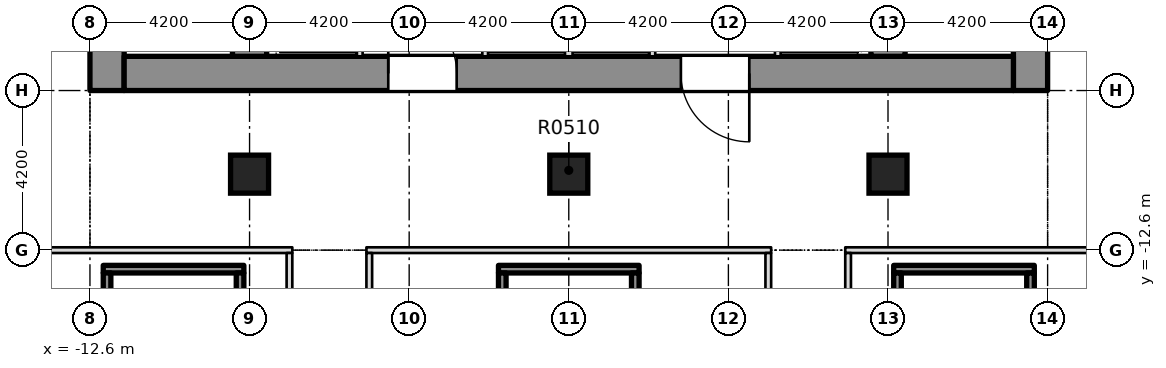
"""IFC4 building model, lengths in metres.
Left out: names, types, materials, properties, quantities, classifications, styles, units other than length and angle.
Written with IfcOpenShell. Run it as: python <this file> out.ifc"""

import sys

from ifc_helpers import new_model, si_unit, direction, frame, frame_2d, origin, origin_2d, place, context, subcontext, project, spatial, rectangle, extrude, element, fill, save


model = new_model("IFC4")
c1 = context("Model", 3, precision=1e-05, world=origin(), true_north=direction((0.0, 1.0)))
c2 = subcontext(c1, "Body", "Model", "MODEL_VIEW")
j1 = project(units=[si_unit("LENGTHUNIT", "METRE"), si_unit("PLANEANGLEUNIT", "RADIAN")], contexts=[c1])
p1 = place(None, origin())
s1 = spatial("IfcSite", under=j1, at=p1, CompositionType="ELEMENT")
p2 = place(p1, origin())
s2 = spatial("IfcBuilding", under=s1, at=p2, CompositionType="ELEMENT")
p3 = place(p2, frame((0.0, 0.0, 30.0)))
s3 = spatial("IfcBuildingStorey", under=s2, at=p3, CompositionType="ELEMENT", Elevation=30.0)
p4 = place(p3, frame((12.15, -8.4, -0.4), z_axis=(0.0, 0.0, 1.0), x_axis=(0.0, 1.0, 0.0)))
e1 = element("IfcWall", 1, at=p4, inside=s3, PredefinedType="SHEAR", context=c2, shape_type="SweptSolid", body=[
    extrude(rectangle(XDim=30.15, YDim=0.9, at=frame_2d((15.075, 0.0))), origin(), (0.0, 0.0, 1.0), 4.58),
])
p5 = place(p4, frame((2.925, 0.0, 0.4)))
e2 = element("IfcOpeningElement", 2, at=p5, cuts=e1, PredefinedType="OPENING", context=c2, shape_type="SweptSolid", body=[
    extrude(rectangle(XDim=0.95, YDim=2.1, at=frame_2d((0.475, 1.05))), frame((0.0, 0.46, 0.0), z_axis=(0.0, -1.0, 0.0), x_axis=(1.0, 0.0, 0.0)), (0.0, 0.0, 1.0), 0.92),
])
p6 = place(p4, frame((7.025, 0.0, 0.4)))
e3 = element("IfcOpeningElement", 3, at=p6, cuts=e1, PredefinedType="OPENING", context=c2, shape_type="SweptSolid", body=[
    extrude(rectangle(XDim=0.95, YDim=2.1, at=frame_2d((0.475, 1.05))), frame((0.0, 0.46, 0.0), z_axis=(0.0, -1.0, 0.0), x_axis=(1.0, 0.0, 0.0)), (0.0, 0.0, 1.0), 0.92),
])
p7 = place(p4, frame((10.875, 0.0, 0.4)))
e4 = element("IfcOpeningElement", 4, at=p7, cuts=e1, PredefinedType="OPENING", context=c2, shape_type="SweptSolid", body=[
    extrude(rectangle(XDim=0.95, YDim=2.1, at=frame_2d((0.475, 1.05))), frame((0.0, 0.46, 0.0), z_axis=(0.0, -1.0, 0.0), x_axis=(1.0, 0.0, 0.0)), (0.0, 0.0, 1.0), 0.92),
])
p8 = place(p4, frame((15.625, 0.0, 0.4)))
e5 = element("IfcOpeningElement", 5, at=p8, cuts=e1, PredefinedType="OPENING", context=c2, shape_type="SweptSolid", body=[
    extrude(rectangle(XDim=0.95, YDim=2.1, at=frame_2d((0.475, 1.05))), frame((0.0, 0.46, 0.0), z_axis=(0.0, -1.0, 0.0), x_axis=(1.0, 0.0, 0.0)), (0.0, 0.0, 1.0), 0.92),
])
p9 = place(p4, frame((24.75, 0.0, 0.4)))
e6 = element("IfcOpeningElement", 6, at=p9, cuts=e1, PredefinedType="OPENING", context=c2, shape_type="SweptSolid", body=[
    extrude(rectangle(XDim=0.95, YDim=2.1, at=frame_2d((0.475, 1.05))), frame((0.0, 0.46, 0.0), z_axis=(0.0, -1.0, 0.0), x_axis=(1.0, 0.0, 0.0)), (0.0, 0.0, 1.0), 0.92),
])
p10 = place(p4, frame((19.3, 0.0, 0.4)))
e7 = element("IfcOpeningElement", 7, at=p10, cuts=e1, PredefinedType="OPENING", context=c2, shape_type="SweptSolid", body=[
    extrude(rectangle(XDim=1.2, YDim=2.1, at=frame_2d((0.6, 1.05))), frame((0.0, 0.46, 0.0), z_axis=(0.0, -1.0, 0.0), x_axis=(1.0, 0.0, 0.0)), (0.0, 0.0, 1.0), 0.92),
])
p11 = place(p3, frame((-12.15, -8.4, -0.4), z_axis=(0.0, 0.0, 1.0), x_axis=(0.0, 1.0, 0.0)))
e8 = element("IfcWall", 8, at=p11, inside=s3, PredefinedType="SHEAR", context=c2, shape_type="SweptSolid", body=[
    extrude(rectangle(XDim=30.15, YDim=0.9, at=frame_2d((15.075, 0.0))), origin(), (0.0, 0.0, 1.0), 4.58),
])
p12 = place(p11, frame((2.875, 0.0, 0.4)))
e9 = element("IfcOpeningElement", 9, at=p12, cuts=e8, PredefinedType="OPENING", context=c2, shape_type="SweptSolid", body=[
    extrude(rectangle(XDim=0.95, YDim=2.1, at=frame_2d((0.475, 1.05))), frame((0.0, 0.46, 0.0), z_axis=(0.0, -1.0, 0.0), x_axis=(1.0, 0.0, 0.0)), (0.0, 0.0, 1.0), 0.92),
])
p13 = place(p11, frame((6.575, 0.0, 0.4)))
e10 = element("IfcOpeningElement", 10, at=p13, cuts=e8, PredefinedType="OPENING", context=c2, shape_type="SweptSolid", body=[
    extrude(rectangle(XDim=0.95, YDim=2.1, at=frame_2d((0.475, 1.05))), frame((0.0, 0.46, 0.0), z_axis=(0.0, -1.0, 0.0), x_axis=(1.0, 0.0, 0.0)), (0.0, 0.0, 1.0), 0.92),
])
p14 = place(p11, frame((9.425, 0.0, 0.4)))
e11 = element("IfcOpeningElement", 11, at=p14, cuts=e8, PredefinedType="OPENING", context=c2, shape_type="SweptSolid", body=[
    extrude(rectangle(XDim=0.95, YDim=2.1, at=frame_2d((0.475, 1.05))), frame((0.0, 0.46, 0.0), z_axis=(0.0, -1.0, 0.0), x_axis=(1.0, 0.0, 0.0)), (0.0, 0.0, 1.0), 0.92),
])
p15 = place(p11, frame((13.225, 0.0, 0.4)))
e12 = element("IfcOpeningElement", 12, at=p15, cuts=e8, PredefinedType="OPENING", context=c2, shape_type="SweptSolid", body=[
    extrude(rectangle(XDim=0.95, YDim=2.1, at=frame_2d((0.475, 1.05))), frame((0.0, 0.46, 0.0), z_axis=(0.0, -1.0, 0.0), x_axis=(1.0, 0.0, 0.0)), (0.0, 0.0, 1.0), 0.92),
])
p16 = place(p11, frame((16.775, 0.0, 0.4)))
e13 = element("IfcOpeningElement", 13, at=p16, cuts=e8, PredefinedType="OPENING", context=c2, shape_type="SweptSolid", body=[
    extrude(rectangle(XDim=0.95, YDim=2.1, at=frame_2d((0.475, 1.05))), frame((0.0, 0.46, 0.0), z_axis=(0.0, -1.0, 0.0), x_axis=(1.0, 0.0, 0.0)), (0.0, 0.0, 1.0), 0.92),
])
p17 = place(p11, frame((24.75, 0.0, 0.4)))
e14 = element("IfcOpeningElement", 14, at=p17, cuts=e8, PredefinedType="OPENING", context=c2, shape_type="SweptSolid", body=[
    extrude(rectangle(XDim=0.95, YDim=2.1, at=frame_2d((0.475, 1.05))), frame((0.0, 0.46, 0.0), z_axis=(0.0, -1.0, 0.0), x_axis=(1.0, 0.0, 0.0)), (0.0, 0.0, 1.0), 0.92),
])
p18 = place(p11, frame((19.3, 0.0, 0.4)))
e15 = element("IfcOpeningElement", 15, at=p18, cuts=e8, PredefinedType="OPENING", context=c2, shape_type="SweptSolid", body=[
    extrude(rectangle(XDim=1.2, YDim=2.1, at=frame_2d((0.6, 1.05))), frame((0.0, 0.46, 0.0), z_axis=(0.0, -1.0, 0.0), x_axis=(1.0, 0.0, 0.0)), (0.0, 0.0, 1.0), 0.92),
])
p19 = place(p3, frame((-11.7, -7.95, -0.4), z_axis=(0.0, 0.0, 1.0), x_axis=(1.0, 0.0, 0.0)))
e16 = element("IfcWall", 16, at=p19, inside=s3, PredefinedType="SHEAR", context=c2, shape_type="SweptSolid", body=[
    extrude(rectangle(XDim=23.4, YDim=0.9, at=frame_2d((11.7, 0.0))), origin(), (0.0, 0.0, 1.0), 4.58),
])
p20 = place(p19, frame((6.95, 0.0, 0.4)))
e17 = element("IfcOpeningElement", 17, at=p20, cuts=e16, PredefinedType="OPENING", context=c2, shape_type="SweptSolid", body=[
    extrude(rectangle(XDim=1.8, YDim=2.1, at=frame_2d((0.9, 1.05))), frame((0.0, 0.46, 0.0), z_axis=(0.0, -1.0, 0.0), x_axis=(1.0, 0.0, 0.0)), (0.0, 0.0, 1.0), 0.92),
])
p21 = place(p19, frame((14.65, 0.0, 0.4)))
e18 = element("IfcOpeningElement", 18, at=p21, cuts=e16, PredefinedType="OPENING", context=c2, shape_type="SweptSolid", body=[
    extrude(rectangle(XDim=1.8, YDim=2.1, at=frame_2d((0.9, 1.05))), frame((0.0, 0.46, 0.0), z_axis=(0.0, -1.0, 0.0), x_axis=(1.0, 0.0, 0.0)), (0.0, 0.0, 1.0), 0.92),
])
p22 = place(p3, frame((-8.4, -7.5, -0.4), z_axis=(0.0, 0.0, 1.0), x_axis=(0.0, 1.0, 0.0)))
e19 = element("IfcWall", 19, at=p22, inside=s3, PredefinedType="SHEAR", context=c2, shape_type="SweptSolid", body=[
    extrude(rectangle(XDim=28.35, YDim=0.9, at=frame_2d((14.175, 0.0))), origin(), (0.0, 0.0, 1.0), 4.58),
])
p23 = place(p22, frame((18.4, 0.0, 0.4)))
e20 = element("IfcOpeningElement", 20, at=p23, cuts=e19, PredefinedType="OPENING", context=c2, shape_type="SweptSolid", body=[
    extrude(rectangle(XDim=1.2, YDim=2.1, at=frame_2d((0.6, 1.05))), frame((0.0, 0.46, 0.0), z_axis=(0.0, -1.0, 0.0), x_axis=(1.0, 0.0, 0.0)), (0.0, 0.0, 1.0), 0.92),
])
p24 = place(p3, frame((8.4, -7.5, -0.4), z_axis=(0.0, 0.0, 1.0), x_axis=(0.0, 1.0, 0.0)))
e21 = element("IfcWall", 21, at=p24, inside=s3, PredefinedType="SHEAR", context=c2, shape_type="SweptSolid", body=[
    extrude(rectangle(XDim=28.35, YDim=0.9, at=frame_2d((14.175, 0.0))), origin(), (0.0, 0.0, 1.0), 4.58),
])
p25 = place(p24, frame((18.4, 0.0, 0.4)))
e22 = element("IfcOpeningElement", 22, at=p25, cuts=e21, PredefinedType="OPENING", context=c2, shape_type="SweptSolid", body=[
    extrude(rectangle(XDim=1.2, YDim=2.1, at=frame_2d((0.6, 1.05))), frame((0.0, 0.46, 0.0), z_axis=(0.0, -1.0, 0.0), x_axis=(1.0, 0.0, 0.0)), (0.0, 0.0, 1.0), 0.92),
])
for number, where, z_axis, x_axis in (
    (23, (-8.4, -10.6, -0.4), (0.0, 0.0, 1.0), (1.0, 0.0, 0.0)),
    (24, (0.0, -10.6, -0.4), (0.0, 0.0, 1.0), (1.0, 0.0, 0.0)),
    (25, (8.4, -10.6, -0.4), (0.0, 0.0, 1.0), (1.0, 0.0, 0.0)),
):
    element("IfcColumn", number, at=place(p3, frame(where, z_axis=z_axis, x_axis=x_axis)), inside=s3, PredefinedType="COLUMN", context=c2, shape_type="SweptSolid", body=[
        extrude(rectangle(XDim=1.0, YDim=1.0, at=origin_2d()), origin(), (0.0, 0.0, 1.0), 4.58),
    ])
p26 = place(p3, frame((-16.9, -12.6, 0.0), z_axis=(0.0, 0.0, 1.0), x_axis=(1.0, 0.0, 0.0)))
e26 = element("IfcWall", 26, at=p26, inside=s3, PredefinedType="PARTITIONING", context=c2, shape_type="SweptSolid", body=[
    extrude(rectangle(XDim=9.625, YDim=0.15, at=frame_2d((4.812, 0.0))), origin(), (0.0, 0.0, 1.0), 4.18),
])
p27 = place(p3, frame((-5.325, -12.6, 0.0), z_axis=(0.0, 0.0, 1.0), x_axis=(1.0, 0.0, 0.0)))
e27 = element("IfcWall", 27, at=p27, inside=s3, PredefinedType="PARTITIONING", context=c2, shape_type="SweptSolid", body=[
    extrude(rectangle(XDim=10.65, YDim=0.15, at=frame_2d((5.325, 0.0))), origin(), (0.0, 0.0, 1.0), 4.18),
])
p28 = place(p3, frame((7.275, -12.6, 0.0), z_axis=(0.0, 0.0, 1.0), x_axis=(1.0, 0.0, 0.0)))
e28 = element("IfcWall", 28, at=p28, inside=s3, PredefinedType="PARTITIONING", context=c2, shape_type="SweptSolid", body=[
    extrude(rectangle(XDim=9.625, YDim=0.15, at=frame_2d((4.812, 0.0))), origin(), (0.0, 0.0, 1.0), 4.18),
])
for number, where, z_axis, x_axis in (
    (29, (-7.35, -18.125, 0.0), (0.0, 0.0, 1.0), (0.0, 1.0, 0.0)),
    (30, (-5.25, -18.125, 0.0), (0.0, 0.0, 1.0), (0.0, 1.0, 0.0)),
    (31, (5.25, -18.125, 0.0), (0.0, 0.0, 1.0), (0.0, 1.0, 0.0)),
    (32, (7.35, -18.125, 0.0), (0.0, 0.0, 1.0), (0.0, 1.0, 0.0)),
):
    element("IfcWall", number, at=place(p3, frame(where, z_axis=z_axis, x_axis=x_axis)), inside=s3, PredefinedType="PARTITIONING", context=c2, shape_type="SweptSolid", body=[
        extrude(rectangle(XDim=5.45, YDim=0.15, at=frame_2d((2.725, 0.0))), origin(), (0.0, 0.0, 1.0), 4.18),
    ])
p29 = place(p3, frame((-5.5, -7.499, 0.0), z_axis=(0.0, 0.0, 1.0), x_axis=(0.0, 1.0, 0.0)))
e33 = element("IfcWall", 33, at=p29, inside=s3, PredefinedType="PARTITIONING", context=c2, shape_type="SweptSolid", body=[
    extrude(rectangle(XDim=11.924, YDim=0.15, at=frame_2d((5.962, 0.0))), origin(), (0.0, 0.0, 1.0), 4.18),
])
p30 = place(p29, frame((0.949, 0.0, 0.0)))
e34 = element("IfcOpeningElement", 34, at=p30, cuts=e33, PredefinedType="OPENING", context=c2, shape_type="SweptSolid", body=[
    extrude(rectangle(XDim=1.1, YDim=2.1, at=frame_2d((0.55, 1.05))), frame((0.0, 0.085, 0.0), z_axis=(0.0, -1.0, 0.0), x_axis=(1.0, 0.0, 0.0)), (0.0, 0.0, 1.0), 0.17),
])
p31 = place(p29, frame((3.949, 0.0, 0.0)))
e35 = element("IfcOpeningElement", 35, at=p31, cuts=e33, PredefinedType="OPENING", context=c2, shape_type="SweptSolid", body=[
    extrude(rectangle(XDim=1.1, YDim=2.1, at=frame_2d((0.55, 1.05))), frame((0.0, 0.085, 0.0), z_axis=(0.0, -1.0, 0.0), x_axis=(1.0, 0.0, 0.0)), (0.0, 0.0, 1.0), 0.17),
])
p32 = place(p29, frame((6.949, 0.0, 0.0)))
e36 = element("IfcOpeningElement", 36, at=p32, cuts=e33, PredefinedType="OPENING", context=c2, shape_type="SweptSolid", body=[
    extrude(rectangle(XDim=1.1, YDim=2.1, at=frame_2d((0.55, 1.05))), frame((0.0, 0.085, 0.0), z_axis=(0.0, -1.0, 0.0), x_axis=(1.0, 0.0, 0.0)), (0.0, 0.0, 1.0), 0.17),
])
p33 = place(p29, frame((9.949, 0.0, 0.0)))
e37 = element("IfcOpeningElement", 37, at=p33, cuts=e33, PredefinedType="OPENING", context=c2, shape_type="SweptSolid", body=[
    extrude(rectangle(XDim=1.1, YDim=2.1, at=frame_2d((0.55, 1.05))), frame((0.0, 0.085, 0.0), z_axis=(0.0, -1.0, 0.0), x_axis=(1.0, 0.0, 0.0)), (0.0, 0.0, 1.0), 0.17),
])
p34 = place(p3, frame((-2.2, -7.499, 0.0), z_axis=(0.0, 0.0, 1.0), x_axis=(0.0, 1.0, 0.0)))
e38 = element("IfcWall", 38, at=p34, inside=s3, PredefinedType="PARTITIONING", context=c2, shape_type="SweptSolid", body=[
    extrude(rectangle(XDim=11.924, YDim=0.15, at=frame_2d((5.962, 0.0))), origin(), (0.0, 0.0, 1.0), 4.18),
])
p35 = place(p34, frame((0.949, 0.0, 0.0)))
e39 = element("IfcOpeningElement", 39, at=p35, cuts=e38, PredefinedType="OPENING", context=c2, shape_type="SweptSolid", body=[
    extrude(rectangle(XDim=1.1, YDim=2.1, at=frame_2d((0.55, 1.05))), frame((0.0, 0.085, 0.0), z_axis=(0.0, -1.0, 0.0), x_axis=(1.0, 0.0, 0.0)), (0.0, 0.0, 1.0), 0.17),
])
p36 = place(p34, frame((3.949, 0.0, 0.0)))
e40 = element("IfcOpeningElement", 40, at=p36, cuts=e38, PredefinedType="OPENING", context=c2, shape_type="SweptSolid", body=[
    extrude(rectangle(XDim=1.1, YDim=2.1, at=frame_2d((0.55, 1.05))), frame((0.0, 0.085, 0.0), z_axis=(0.0, -1.0, 0.0), x_axis=(1.0, 0.0, 0.0)), (0.0, 0.0, 1.0), 0.17),
])
p37 = place(p34, frame((6.949, 0.0, 0.0)))
e41 = element("IfcOpeningElement", 41, at=p37, cuts=e38, PredefinedType="OPENING", context=c2, shape_type="SweptSolid", body=[
    extrude(rectangle(XDim=1.1, YDim=2.1, at=frame_2d((0.55, 1.05))), frame((0.0, 0.085, 0.0), z_axis=(0.0, -1.0, 0.0), x_axis=(1.0, 0.0, 0.0)), (0.0, 0.0, 1.0), 0.17),
])
p38 = place(p34, frame((9.949, 0.0, 0.0)))
e42 = element("IfcOpeningElement", 42, at=p38, cuts=e38, PredefinedType="OPENING", context=c2, shape_type="SweptSolid", body=[
    extrude(rectangle(XDim=1.1, YDim=2.1, at=frame_2d((0.55, 1.05))), frame((0.0, 0.085, 0.0), z_axis=(0.0, -1.0, 0.0), x_axis=(1.0, 0.0, 0.0)), (0.0, 0.0, 1.0), 0.17),
])
p39 = place(p3, frame((0.0, -7.499, 0.0), z_axis=(0.0, 0.0, 1.0), x_axis=(0.0, 1.0, 0.0)))
e43 = element("IfcWall", 43, at=p39, inside=s3, PredefinedType="PARTITIONING", context=c2, shape_type="SweptSolid", body=[
    extrude(rectangle(XDim=11.924, YDim=0.2, at=frame_2d((5.962, 0.0))), origin(), (0.0, 0.0, 1.0), 4.18),
])
p40 = place(p3, frame((2.2, -7.499, 0.0), z_axis=(0.0, 0.0, 1.0), x_axis=(0.0, 1.0, 0.0)))
e44 = element("IfcWall", 44, at=p40, inside=s3, PredefinedType="PARTITIONING", context=c2, shape_type="SweptSolid", body=[
    extrude(rectangle(XDim=11.924, YDim=0.15, at=frame_2d((5.962, 0.0))), origin(), (0.0, 0.0, 1.0), 4.18),
])
p41 = place(p3, frame((5.5, -7.499, 0.0), z_axis=(0.0, 0.0, 1.0), x_axis=(0.0, 1.0, 0.0)))
e45 = element("IfcWall", 45, at=p41, inside=s3, PredefinedType="PARTITIONING", context=c2, shape_type="SweptSolid", body=[
    extrude(rectangle(XDim=11.924, YDim=0.15, at=frame_2d((5.962, 0.0))), origin(), (0.0, 0.0, 1.0), 4.18),
])
p42 = place(p41, frame((6.949, 0.0, 0.0)))
e46 = element("IfcOpeningElement", 46, at=p42, cuts=e45, PredefinedType="OPENING", context=c2, shape_type="SweptSolid", body=[
    extrude(rectangle(XDim=1.1, YDim=2.1, at=frame_2d((0.55, 1.05))), frame((0.0, 0.085, 0.0), z_axis=(0.0, -1.0, 0.0), x_axis=(1.0, 0.0, 0.0)), (0.0, 0.0, 1.0), 0.17),
])
p43 = place(p41, frame((9.949, 0.0, 0.0)))
e47 = element("IfcOpeningElement", 47, at=p43, cuts=e45, PredefinedType="OPENING", context=c2, shape_type="SweptSolid", body=[
    extrude(rectangle(XDim=1.1, YDim=2.1, at=frame_2d((0.55, 1.05))), frame((0.0, 0.085, 0.0), z_axis=(0.0, -1.0, 0.0), x_axis=(1.0, 0.0, 0.0)), (0.0, 0.0, 1.0), 0.17),
])
p44 = place(p3, frame((-12.25, -13.1, 0.0), z_axis=(0.0, 0.0, 1.0), x_axis=(1.0, 0.0, 0.0)))
e48 = element("IfcWall", 48, at=p44, inside=s3, PredefinedType="SOLIDWALL", context=c2, shape_type="SweptSolid", body=[
    extrude(rectangle(XDim=3.7, YDim=0.2, at=frame_2d((1.85, 0.0))), origin(), (0.0, 0.0, 1.0), 4.18),
])
p45 = place(p3, frame((-12.15, -19.8, 0.0), z_axis=(0.0, 0.0, 1.0), x_axis=(0.0, 1.0, 0.0)))
e49 = element("IfcWall", 49, at=p45, inside=s3, PredefinedType="SOLIDWALL", context=c2, shape_type="SweptSolid", body=[
    extrude(rectangle(XDim=6.6, YDim=0.2, at=frame_2d((3.3, 0.0))), origin(), (0.0, 0.0, 1.0), 4.18),
])
p46 = place(p3, frame((-8.65, -20.3, 0.0), z_axis=(0.0, 0.0, 1.0), x_axis=(0.0, 1.0, 0.0)))
e50 = element("IfcWall", 50, at=p46, inside=s3, PredefinedType="SOLIDWALL", context=c2, shape_type="SweptSolid", body=[
    extrude(rectangle(XDim=7.1, YDim=0.2, at=frame_2d((3.55, 0.0))), origin(), (0.0, 0.0, 1.0), 4.18),
])
p47 = place(p3, frame((-1.85, -13.1, 0.0), z_axis=(0.0, 0.0, 1.0), x_axis=(1.0, 0.0, 0.0)))
e51 = element("IfcWall", 51, at=p47, inside=s3, PredefinedType="SOLIDWALL", context=c2, shape_type="SweptSolid", body=[
    extrude(rectangle(XDim=3.7, YDim=0.2, at=frame_2d((1.85, 0.0))), origin(), (0.0, 0.0, 1.0), 4.18),
])
for number, where, z_axis, x_axis in (
    (52, (-1.75, -19.8, 0.0), (0.0, 0.0, 1.0), (0.0, 1.0, 0.0)),
    (53, (1.75, -19.8, 0.0), (0.0, 0.0, 1.0), (0.0, 1.0, 0.0)),
):
    element("IfcWall", number, at=place(p3, frame(where, z_axis=z_axis, x_axis=x_axis)), inside=s3, PredefinedType="SOLIDWALL", context=c2, shape_type="SweptSolid", body=[
        extrude(rectangle(XDim=6.6, YDim=0.2, at=frame_2d((3.3, 0.0))), origin(), (0.0, 0.0, 1.0), 4.18),
    ])
p48 = place(p3, frame((8.55, -13.1, 0.0), z_axis=(0.0, 0.0, 1.0), x_axis=(1.0, 0.0, 0.0)))
e54 = element("IfcWall", 54, at=p48, inside=s3, PredefinedType="SOLIDWALL", context=c2, shape_type="SweptSolid", body=[
    extrude(rectangle(XDim=3.7, YDim=0.2, at=frame_2d((1.85, 0.0))), origin(), (0.0, 0.0, 1.0), 4.18),
])
p49 = place(p3, frame((8.65, -20.3, 0.0), z_axis=(0.0, 0.0, 1.0), x_axis=(0.0, 1.0, 0.0)))
e55 = element("IfcWall", 55, at=p49, inside=s3, PredefinedType="SOLIDWALL", context=c2, shape_type="SweptSolid", body=[
    extrude(rectangle(XDim=7.1, YDim=0.2, at=frame_2d((3.55, 0.0))), origin(), (0.0, 0.0, 1.0), 4.18),
])
p50 = place(p3, frame((12.15, -19.8, 0.0), z_axis=(0.0, 0.0, 1.0), x_axis=(0.0, 1.0, 0.0)))
e56 = element("IfcWall", 56, at=p50, inside=s3, PredefinedType="SOLIDWALL", context=c2, shape_type="SweptSolid", body=[
    extrude(rectangle(XDim=6.6, YDim=0.2, at=frame_2d((3.3, 0.0))), origin(), (0.0, 0.0, 1.0), 4.18),
])
p51 = place(p20, origin())
e57 = element("IfcDoor", 57, at=p51, inside=s3, OperationType="SINGLE_SWING_LEFT", PredefinedType="DOOR", context=c2, shape_type="SweptSolid", body=[
    extrude(rectangle(XDim=1.8, YDim=2.1, at=frame_2d((0.9, 1.05))), frame((0.0, 0.025, 0.0), z_axis=(0.0, -1.0, 0.0), x_axis=(1.0, 0.0, 0.0)), (0.0, 0.0, 1.0), 0.05),
])
fill(e17, e57)
p52 = place(p21, origin())
e58 = element("IfcDoor", 58, at=p52, inside=s3, OperationType="SINGLE_SWING_LEFT", PredefinedType="DOOR", context=c2, shape_type="SweptSolid", body=[
    extrude(rectangle(XDim=1.8, YDim=2.1, at=frame_2d((0.9, 1.05))), frame((0.0, 0.025, 0.0), z_axis=(0.0, -1.0, 0.0), x_axis=(1.0, 0.0, 0.0)), (0.0, 0.0, 1.0), 0.05),
])
fill(e18, e58)
save(model, sys.argv[1])
